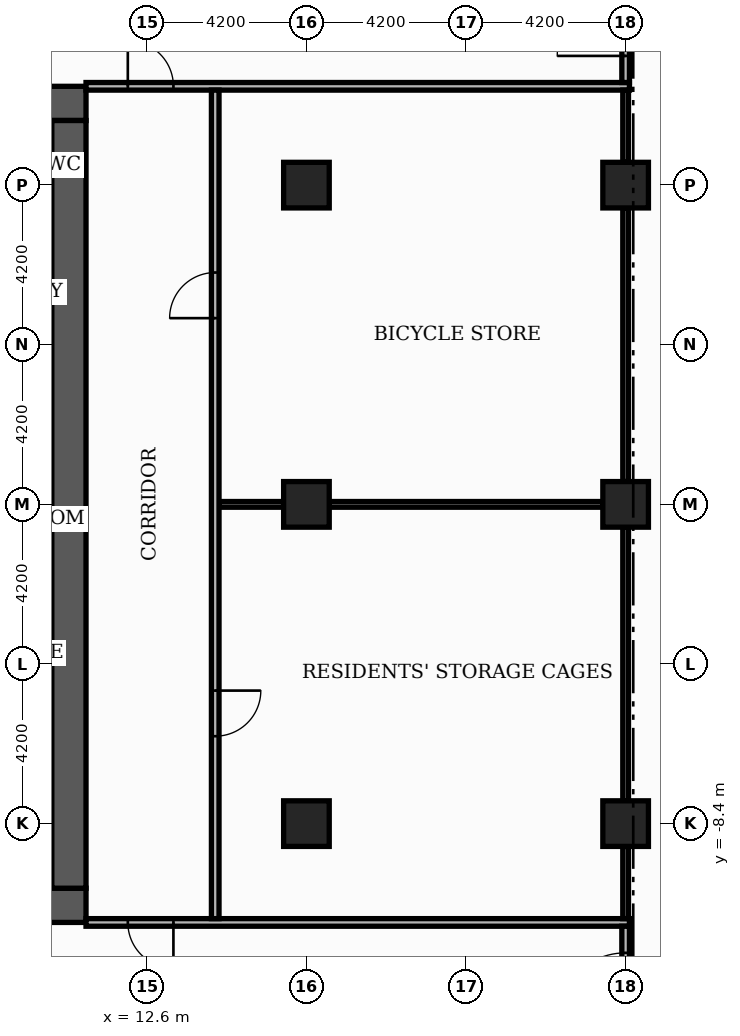
"""IFC4 building model, lengths in metres.
Left out: names, types, materials, properties, quantities, classifications, styles, units other than length and angle.
Written with IfcOpenShell. Run it as: python <this file> out.ifc"""

import sys

from ifc_helpers import new_model, si_unit, direction, frame, frame_2d, origin, origin_2d, place, context, subcontext, project, spatial, rectangle, extrude, element, fill, save


model = new_model("IFC4")
c1 = context("Model", 3, precision=1e-05, world=origin(), true_north=direction((0.0, 1.0)))
c2 = subcontext(c1, "Body", "Model", "MODEL_VIEW")
j1 = project(units=[si_unit("LENGTHUNIT", "METRE"), si_unit("PLANEANGLEUNIT", "RADIAN")], contexts=[c1])
p1 = place(None, origin())
s1 = spatial("IfcSite", under=j1, at=p1, CompositionType="ELEMENT")
p2 = place(p1, origin())
s2 = spatial("IfcBuilding", under=s1, at=p2, CompositionType="ELEMENT")
p3 = place(p2, frame((0.0, 0.0, -4.2)))
s3 = spatial("IfcBuildingStorey", under=s2, at=p3, CompositionType="ELEMENT", Elevation=-4.2)
for number, where, z_axis, x_axis in (
    (1, (9.2, -3.0, 0.0), (0.0, 0.0, 1.0), (1.0, 0.0, 0.0)),
    (2, (9.2, 2.4, 0.0), (0.0, 0.0, 1.0), (1.0, 0.0, 0.0)),
):
    element("IfcWall", number, at=place(p3, frame(where, z_axis=z_axis, x_axis=x_axis)), inside=s3, PredefinedType="SHEAR", context=c2, shape_type="SweptSolid", body=[
        extrude(rectangle(XDim=0.9, YDim=0.2, at=frame_2d((0.45, 0.0))), origin(), (0.0, 0.0, 1.0), 3.78),
    ])
p4 = place(p3, frame((-11.0, -10.55, 0.0), z_axis=(0.0, 0.0, 1.0), x_axis=(1.0, 0.0, 0.0)))
e3 = element("IfcWall", 3, at=p4, inside=s3, PredefinedType="SHEAR", context=c2, shape_type="SweptSolid", body=[
    extrude(rectangle(XDim=22.0, YDim=0.9, at=frame_2d((11.0, 0.0))), origin(), (0.0, 0.0, 1.0), 3.78),
])
p5 = place(p4, frame((7.4, 0.0, 0.0)))
e4 = element("IfcOpeningElement", 4, at=p5, cuts=e3, PredefinedType="OPENING", context=c2, shape_type="SweptSolid", body=[
    extrude(rectangle(XDim=1.8, YDim=2.2, at=frame_2d((0.9, 1.1))), frame((0.0, 0.46, 0.0), z_axis=(0.0, -1.0, 0.0), x_axis=(1.0, 0.0, 0.0)), (0.0, 0.0, 1.0), 0.92),
])
p6 = place(p3, frame((-11.0, 10.55, 0.0), z_axis=(0.0, 0.0, 1.0), x_axis=(1.0, 0.0, 0.0)))
e5 = element("IfcWall", 5, at=p6, inside=s3, PredefinedType="SHEAR", context=c2, shape_type="SweptSolid", body=[
    extrude(rectangle(XDim=22.0, YDim=0.9, at=frame_2d((11.0, 0.0))), origin(), (0.0, 0.0, 1.0), 3.78),
])
p7 = place(p6, frame((13.3, 0.0, 0.0)))
e6 = element("IfcOpeningElement", 6, at=p7, cuts=e5, PredefinedType="OPENING", context=c2, shape_type="SweptSolid", body=[
    extrude(rectangle(XDim=1.8, YDim=2.2, at=frame_2d((0.9, 1.1))), frame((0.0, 0.46, 0.0), z_axis=(0.0, -1.0, 0.0), x_axis=(1.0, 0.0, 0.0)), (0.0, 0.0, 1.0), 0.92),
])
p8 = place(p3, frame((10.55, -10.1, 0.0), z_axis=(0.0, 0.0, 1.0), x_axis=(0.0, 1.0, 0.0)))
e7 = element("IfcWall", 7, at=p8, inside=s3, PredefinedType="SHEAR", context=c2, shape_type="SweptSolid", body=[
    extrude(rectangle(XDim=20.2, YDim=0.9, at=frame_2d((10.1, 0.0))), origin(), (0.0, 0.0, 1.0), 3.78),
])
for number, where, z_axis, x_axis in (
    (8, (25.2, 0.0, 0.0), (0.0, 0.0, 1.0), (1.0, 0.0, 0.0)),
    (9, (25.2, 8.4, 0.0), (0.0, 0.0, 1.0), (1.0, 0.0, 0.0)),
    (10, (25.2, -8.4, 0.0), (0.0, 0.0, 1.0), (1.0, 0.0, 0.0)),
    (11, (16.8, 0.0, 0.0), (0.0, 0.0, 1.0), (1.0, 0.0, 0.0)),
    (12, (16.8, 8.4, 0.0), (0.0, 0.0, 1.0), (1.0, 0.0, 0.0)),
    (13, (16.8, -8.4, 0.0), (0.0, 0.0, 1.0), (1.0, 0.0, 0.0)),
):
    element("IfcColumn", number, at=place(p3, frame(where, z_axis=z_axis, x_axis=x_axis)), inside=s3, PredefinedType="COLUMN", context=c2, shape_type="SweptSolid", body=[
        extrude(rectangle(XDim=1.2, YDim=1.2, at=origin_2d()), origin(), (0.0, 0.0, 1.0), 4.2),
    ])
p9 = place(p3, frame((11.0, -11.0, 0.0), z_axis=(0.0, 0.0, 1.0), x_axis=(1.0, 0.0, 0.0)))
e14 = element("IfcWall", 14, at=p9, inside=s3, PredefinedType="PARTITIONING", context=c2, shape_type="SweptSolid", body=[
    extrude(rectangle(XDim=14.3, YDim=0.2, at=frame_2d((7.15, 0.0))), origin(), (0.0, 0.0, 1.0), 3.78),
])
p10 = place(p9, frame((1.1, 0.0, 0.0)))
e15 = element("IfcOpeningElement", 15, at=p10, cuts=e14, PredefinedType="OPENING", context=c2, shape_type="SweptSolid", body=[
    extrude(rectangle(XDim=1.2, YDim=2.2, at=frame_2d((0.6, 1.1))), frame((0.0, 0.11, 0.0), z_axis=(0.0, -1.0, 0.0), x_axis=(1.0, 0.0, 0.0)), (0.0, 0.0, 1.0), 0.22),
])
p11 = place(p3, frame((14.5, 0.0, 0.0), z_axis=(0.0, 0.0, 1.0), x_axis=(1.0, 0.0, 0.0)))
e16 = element("IfcWall", 16, at=p11, inside=s3, PredefinedType="PARTITIONING", context=c2, shape_type="SweptSolid", body=[
    extrude(rectangle(XDim=1.7, YDim=0.15, at=frame_2d((0.85, 0.0))), origin(), (0.0, 0.0, 1.0), 3.78),
])
p12 = place(p3, frame((17.4, 0.0, 0.0), z_axis=(0.0, 0.0, 1.0), x_axis=(1.0, 0.0, 0.0)))
e17 = element("IfcWall", 17, at=p12, inside=s3, PredefinedType="PARTITIONING", context=c2, shape_type="SweptSolid", body=[
    extrude(rectangle(XDim=7.2, YDim=0.15, at=frame_2d((3.6, 0.0))), origin(), (0.0, 0.0, 1.0), 3.78),
])
p13 = place(p3, frame((11.0, 11.0, 0.0), z_axis=(0.0, 0.0, 1.0), x_axis=(1.0, 0.0, 0.0)))
e18 = element("IfcWall", 18, at=p13, inside=s3, PredefinedType="PARTITIONING", context=c2, shape_type="SweptSolid", body=[
    extrude(rectangle(XDim=14.3, YDim=0.2, at=frame_2d((7.15, 0.0))), origin(), (0.0, 0.0, 1.0), 3.78),
])
p14 = place(p13, frame((1.1, 0.0, 0.0)))
e19 = element("IfcOpeningElement", 19, at=p14, cuts=e18, PredefinedType="OPENING", context=c2, shape_type="SweptSolid", body=[
    extrude(rectangle(XDim=1.2, YDim=2.2, at=frame_2d((0.6, 1.1))), frame((0.0, 0.11, 0.0), z_axis=(0.0, -1.0, 0.0), x_axis=(1.0, 0.0, 0.0)), (0.0, 0.0, 1.0), 0.22),
])
p15 = place(p3, frame((14.4, -10.9, 0.0), z_axis=(0.0, 0.0, 1.0), x_axis=(0.0, 1.0, 0.0)))
e20 = element("IfcWall", 20, at=p15, inside=s3, PredefinedType="PARTITIONING", context=c2, shape_type="SweptSolid", body=[
    extrude(rectangle(XDim=21.8, YDim=0.2, at=frame_2d((10.9, 0.0))), origin(), (0.0, 0.0, 1.0), 3.78),
])
p16 = place(p15, frame((4.8, 0.0, 0.0)))
e21 = element("IfcOpeningElement", 21, at=p16, cuts=e20, PredefinedType="OPENING", context=c2, shape_type="SweptSolid", body=[
    extrude(rectangle(XDim=1.2, YDim=2.2, at=frame_2d((0.6, 1.1))), frame((0.0, 0.11, 0.0), z_axis=(0.0, -1.0, 0.0), x_axis=(1.0, 0.0, 0.0)), (0.0, 0.0, 1.0), 0.22),
])
p17 = place(p15, frame((15.8, 0.0, 0.0)))
e22 = element("IfcOpeningElement", 22, at=p17, cuts=e20, PredefinedType="OPENING", context=c2, shape_type="SweptSolid", body=[
    extrude(rectangle(XDim=1.2, YDim=2.2, at=frame_2d((0.6, 1.1))), frame((0.0, 0.11, 0.0), z_axis=(0.0, -1.0, 0.0), x_axis=(1.0, 0.0, 0.0)), (0.0, 0.0, 1.0), 0.22),
])
p18 = place(p3, frame((25.2, -14.3, 0.0), z_axis=(0.0, 0.0, 1.0), x_axis=(0.0, 1.0, 0.0)))
e23 = element("IfcWall", 23, at=p18, inside=s3, PredefinedType="PARTITIONING", context=c2, shape_type="SweptSolid", body=[
    extrude(rectangle(XDim=3.2, YDim=0.2, at=frame_2d((1.6, 0.0))), origin(), (0.0, 0.0, 1.0), 3.78),
])
p19 = place(p18, frame((0.7, 0.0, 0.0)))
e24 = element("IfcOpeningElement", 24, at=p19, cuts=e23, PredefinedType="OPENING", context=c2, shape_type="SweptSolid", body=[
    extrude(rectangle(XDim=1.8, YDim=2.2, at=frame_2d((0.9, 1.1))), frame((0.0, 0.11, 0.0), z_axis=(0.0, -1.0, 0.0), x_axis=(1.0, 0.0, 0.0)), (0.0, 0.0, 1.0), 0.22),
])
p20 = place(p3, frame((25.2, -10.9, 0.0), z_axis=(0.0, 0.0, 1.0), x_axis=(0.0, 1.0, 0.0)))
e25 = element("IfcWall", 25, at=p20, inside=s3, PredefinedType="PARTITIONING", context=c2, shape_type="SweptSolid", body=[
    extrude(rectangle(XDim=1.9, YDim=0.15, at=frame_2d((0.95, 0.0))), origin(), (0.0, 0.0, 1.0), 3.78),
])
for number, where, z_axis, x_axis in (
    (26, (25.2, -7.8, 0.0), (0.0, 0.0, 1.0), (0.0, 1.0, 0.0)),
    (27, (25.2, 0.6, 0.0), (0.0, 0.0, 1.0), (0.0, 1.0, 0.0)),
):
    element("IfcWall", number, at=place(p3, frame(where, z_axis=z_axis, x_axis=x_axis)), inside=s3, PredefinedType="PARTITIONING", context=c2, shape_type="SweptSolid", body=[
        extrude(rectangle(XDim=7.2, YDim=0.15, at=frame_2d((3.6, 0.0))), origin(), (0.0, 0.0, 1.0), 3.78),
    ])
p21 = place(p3, frame((25.2, 9.0, 0.0), z_axis=(0.0, 0.0, 1.0), x_axis=(0.0, 1.0, 0.0)))
e28 = element("IfcWall", 28, at=p21, inside=s3, PredefinedType="PARTITIONING", context=c2, shape_type="SweptSolid", body=[
    extrude(rectangle(XDim=1.9, YDim=0.15, at=frame_2d((0.95, 0.0))), origin(), (0.0, 0.0, 1.0), 3.78),
])
p22 = place(p3, frame((25.2, 11.1, 0.0), z_axis=(0.0, 0.0, 1.0), x_axis=(0.0, 1.0, 0.0)))
e29 = element("IfcWall", 29, at=p22, inside=s3, PredefinedType="PARTITIONING", context=c2, shape_type="SweptSolid", body=[
    extrude(rectangle(XDim=3.2, YDim=0.2, at=frame_2d((1.6, 0.0))), origin(), (0.0, 0.0, 1.0), 3.78),
])
p23 = place(p22, frame((0.7, 0.0, 0.0)))
e30 = element("IfcOpeningElement", 30, at=p23, cuts=e29, PredefinedType="OPENING", context=c2, shape_type="SweptSolid", body=[
    extrude(rectangle(XDim=1.8, YDim=2.2, at=frame_2d((0.9, 1.1))), frame((0.0, 0.11, 0.0), z_axis=(0.0, -1.0, 0.0), x_axis=(1.0, 0.0, 0.0)), (0.0, 0.0, 1.0), 0.22),
])
p24 = place(p19, origin())
e31 = element("IfcDoor", 31, at=p24, inside=s3, OperationType="DOUBLE_DOOR_SINGLE_SWING", PredefinedType="DOOR", context=c2, shape_type="SweptSolid", body=[
    extrude(rectangle(XDim=1.8, YDim=2.2, at=frame_2d((0.9, 1.1))), frame((0.0, 0.025, 0.0), z_axis=(0.0, -1.0, 0.0), x_axis=(1.0, 0.0, 0.0)), (0.0, 0.0, 1.0), 0.05),
])
fill(e24, e31)
p25 = place(p10, origin())
e32 = element("IfcDoor", 32, at=p25, inside=s3, OperationType="SINGLE_SWING_RIGHT", PredefinedType="DOOR", context=c2, shape_type="SweptSolid", body=[
    extrude(rectangle(XDim=1.2, YDim=2.2, at=frame_2d((0.6, 1.1))), frame((0.0, 0.025, 0.0), z_axis=(0.0, -1.0, 0.0), x_axis=(1.0, 0.0, 0.0)), (0.0, 0.0, 1.0), 0.05),
])
fill(e15, e32)
p26 = place(p16, origin())
e33 = element("IfcDoor", 33, at=p26, inside=s3, OperationType="SINGLE_SWING_RIGHT", PredefinedType="DOOR", context=c2, shape_type="SweptSolid", body=[
    extrude(rectangle(XDim=1.2, YDim=2.2, at=frame_2d((0.6, 1.1))), frame((0.0, 0.025, 0.0), z_axis=(0.0, -1.0, 0.0), x_axis=(1.0, 0.0, 0.0)), (0.0, 0.0, 1.0), 0.05),
])
fill(e21, e33)
p27 = place(p17, origin())
e34 = element("IfcDoor", 34, at=p27, inside=s3, OperationType="SINGLE_SWING_LEFT", PredefinedType="DOOR", context=c2, shape_type="SweptSolid", body=[
    extrude(rectangle(XDim=1.2, YDim=2.2, at=frame_2d((0.6, 1.1))), frame((0.0, 0.025, 0.0), z_axis=(0.0, -1.0, 0.0), x_axis=(1.0, 0.0, 0.0)), (0.0, 0.0, 1.0), 0.05),
])
fill(e22, e34)
p28 = place(p14, origin())
e35 = element("IfcDoor", 35, at=p28, inside=s3, OperationType="SINGLE_SWING_LEFT", PredefinedType="DOOR", context=c2, shape_type="SweptSolid", body=[
    extrude(rectangle(XDim=1.2, YDim=2.2, at=frame_2d((0.6, 1.1))), frame((0.0, 0.025, 0.0), z_axis=(0.0, -1.0, 0.0), x_axis=(1.0, 0.0, 0.0)), (0.0, 0.0, 1.0), 0.05),
])
fill(e19, e35)
p29 = place(p23, origin())
e36 = element("IfcDoor", 36, at=p29, inside=s3, OperationType="DOUBLE_DOOR_SINGLE_SWING", PredefinedType="DOOR", context=c2, shape_type="SweptSolid", body=[
    extrude(rectangle(XDim=1.8, YDim=2.2, at=frame_2d((0.9, 1.1))), frame((0.0, 0.025, 0.0), z_axis=(0.0, -1.0, 0.0), x_axis=(1.0, 0.0, 0.0)), (0.0, 0.0, 1.0), 0.05),
])
fill(e30, e36)
save(model, sys.argv[1])
